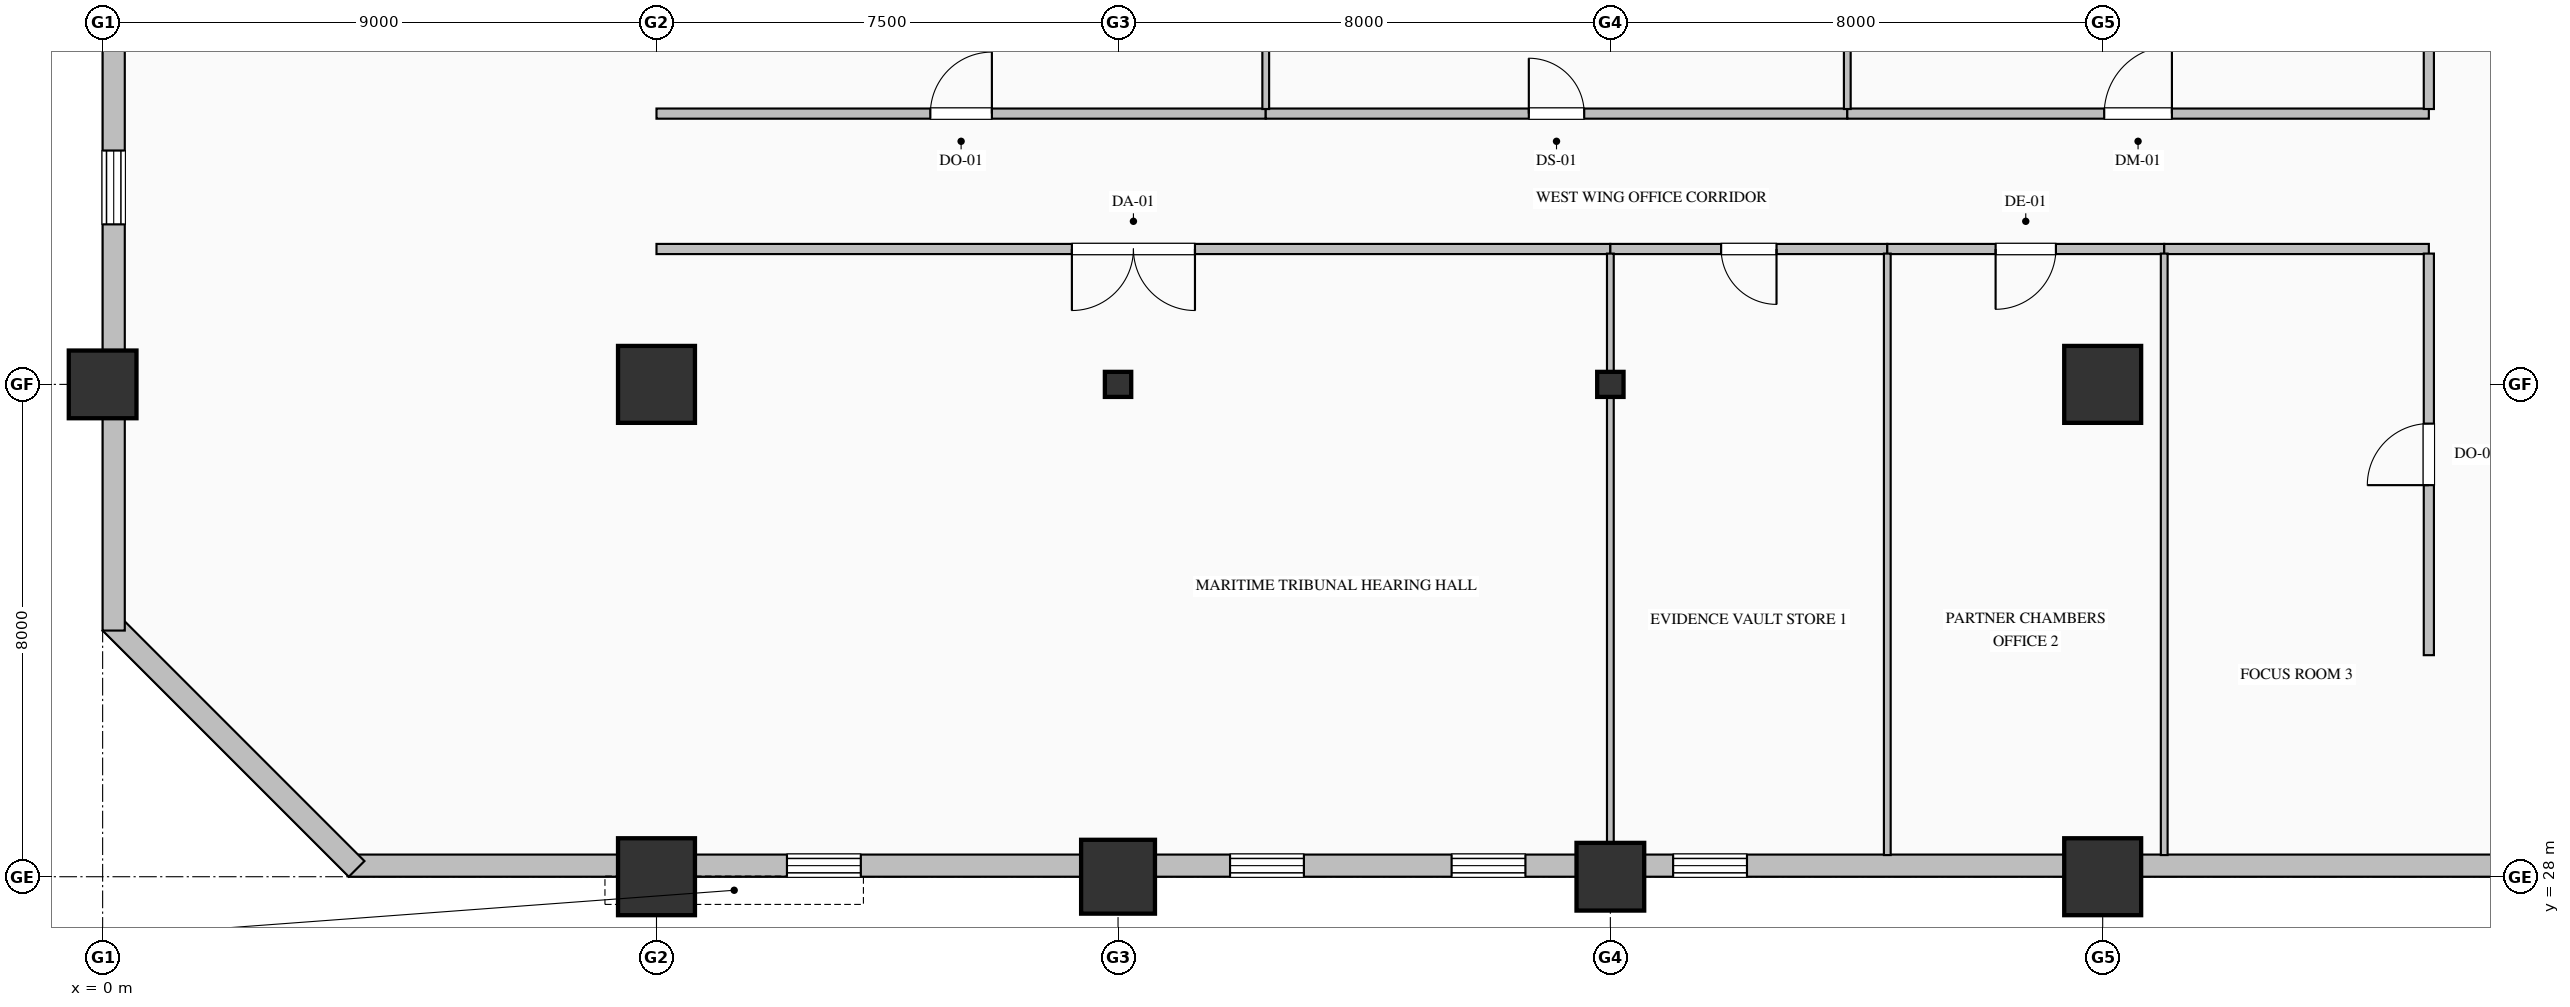
"""IFC4 building model, lengths in metres.
Left out: names, types, materials, properties, quantities, classifications, styles, units other than length and angle.
Written with IfcOpenShell. Run it as: python <this file> out.ifc"""

import sys

from ifc_helpers import new_model, si_unit, direction, frame, frame_2d, origin, origin_2d, place, context, subcontext, project, spatial, rectangle, hollow_rectangle, hollow_circle, i_section, extrude, element, fill, save


model = new_model("IFC4")
c1 = context("Model", 3, precision=1e-05, world=origin(), true_north=direction((0.0, 1.0)))
c2 = subcontext(c1, "Body", "Model", "MODEL_VIEW")
j1 = project(units=[si_unit("LENGTHUNIT", "METRE"), si_unit("PLANEANGLEUNIT", "RADIAN")], contexts=[c1])
p1 = place(None, origin())
s1 = spatial("IfcSite", under=j1, at=p1, CompositionType="ELEMENT")
p2 = place(p1, origin())
s2 = spatial("IfcBuilding", under=s1, at=p2, CompositionType="ELEMENT")
p3 = place(p2, frame((0.0, 0.0, 104.2)))
s3 = spatial("IfcBuildingStorey", under=s2, at=p3, CompositionType="ELEMENT", Elevation=104.2)
p4 = place(p3, frame((0.0, 36.0, 0.0), z_axis=(0.0, 0.0, 1.0), x_axis=(1.0, 0.0, 0.0)))
e1 = element("IfcColumn", 1, at=p4, inside=s3, PredefinedType="COLUMN", context=c2, shape_type="SweptSolid", body=[
    extrude(hollow_rectangle(XDim=1.1, YDim=1.1, WallThickness=0.04, at=origin_2d()), origin(), (0.0, 0.0, 1.0), 4.0),
])
for number, where, z_axis, x_axis in (
    (2, (9.0, 28.0, 0.0), (0.0, 0.0, 1.0), (1.0, 0.0, 0.0)),
    (3, (9.0, 36.0, 0.0), (0.0, 0.0, 1.0), (1.0, 0.0, 0.0)),
):
    element("IfcColumn", number, at=place(p3, frame(where, z_axis=z_axis, x_axis=x_axis)), inside=s3, PredefinedType="COLUMN", context=c2, shape_type="SweptSolid", body=[
        extrude(hollow_rectangle(XDim=1.25, YDim=1.25, WallThickness=0.045, at=origin_2d()), origin(), (0.0, 0.0, 1.0), 4.0),
    ])
p5 = place(p3, frame((16.5, 28.0, 0.0), z_axis=(0.0, 0.0, 1.0), x_axis=(1.0, 0.0, 0.0)))
e4 = element("IfcColumn", 4, at=p5, inside=s3, PredefinedType="COLUMN", context=c2, shape_type="SweptSolid", body=[
    extrude(hollow_circle(Radius=0.6, WallThickness=0.04, at=origin_2d()), origin(), (0.0, 0.0, 1.0), 4.0),
])
p6 = place(p3, frame((16.5, 36.0, 0.0), z_axis=(0.0, 0.0, 1.0), x_axis=(1.0, 0.0, 0.0)))
e5 = element("IfcColumn", 5, at=p6, inside=s3, PredefinedType="COLUMN", context=c2, shape_type="SweptSolid", body=[
    extrude(i_section(OverallWidth=0.407, OverallDepth=0.428, WebThickness=0.02, FlangeThickness=0.035, FilletRadius=0.022, at=origin_2d()), origin(), (0.0, 0.0, 1.0), 4.0),
])
p7 = place(p3, frame((24.5, 28.0, 0.0), z_axis=(0.0, 0.0, 1.0), x_axis=(1.0, 0.0, 0.0)))
e6 = element("IfcColumn", 6, at=p7, inside=s3, PredefinedType="COLUMN", context=c2, shape_type="SweptSolid", body=[
    extrude(hollow_rectangle(XDim=1.1, YDim=1.1, WallThickness=0.04, at=origin_2d()), origin(), (0.0, 0.0, 1.0), 4.0),
])
p8 = place(p3, frame((24.5, 36.0, 0.0), z_axis=(0.0, 0.0, 1.0), x_axis=(1.0, 0.0, 0.0)))
e7 = element("IfcColumn", 7, at=p8, inside=s3, PredefinedType="COLUMN", context=c2, shape_type="SweptSolid", body=[
    extrude(i_section(OverallWidth=0.407, OverallDepth=0.428, WebThickness=0.02, FlangeThickness=0.035, FilletRadius=0.022, at=origin_2d()), origin(), (0.0, 0.0, 1.0), 4.0),
])
for number, where, z_axis, x_axis in (
    (8, (32.5, 28.0, 0.0), (0.0, 0.0, 1.0), (1.0, 0.0, 0.0)),
    (9, (32.5, 36.0, 0.0), (0.0, 0.0, 1.0), (1.0, 0.0, 0.0)),
):
    element("IfcColumn", number, at=place(p3, frame(where, z_axis=z_axis, x_axis=x_axis)), inside=s3, PredefinedType="COLUMN", context=c2, shape_type="SweptSolid", body=[
        extrude(hollow_rectangle(XDim=1.25, YDim=1.25, WallThickness=0.045, at=origin_2d()), origin(), (0.0, 0.0, 1.0), 4.0),
    ])
p9 = place(p3, frame((40.52, 28.18, 0.0), z_axis=(0.0, 0.0, 1.0), x_axis=(-1.0, 0.0, 0.0)))
e10 = element("IfcWall", 10, at=p9, inside=s3, PredefinedType="SOLIDWALL", context=c2, shape_type="SweptSolid", body=[
    extrude(rectangle(XDim=36.52, YDim=0.36, at=frame_2d((18.26, 0.0))), origin(), (0.0, 0.0, 1.0), 2.95),
])
p10 = place(p9, frame((13.8, 0.0, 0.7)))
e11 = element("IfcOpeningElement", 11, at=p10, cuts=e10, PredefinedType="OPENING", context=c2, shape_type="SweptSolid", body=[
    extrude(rectangle(XDim=1.2, YDim=1.85, at=frame_2d((0.6, 0.925))), frame((0.0, 0.19, 0.0), z_axis=(0.0, -1.0, 0.0), x_axis=(1.0, 0.0, 0.0)), (0.0, 0.0, 1.0), 0.38),
])
p11 = place(p9, frame((17.4, 0.0, 0.7)))
e12 = element("IfcOpeningElement", 12, at=p11, cuts=e10, PredefinedType="OPENING", context=c2, shape_type="SweptSolid", body=[
    extrude(rectangle(XDim=1.2, YDim=1.85, at=frame_2d((0.6, 0.925))), frame((0.0, 0.19, 0.0), z_axis=(0.0, -1.0, 0.0), x_axis=(1.0, 0.0, 0.0)), (0.0, 0.0, 1.0), 0.38),
])
p12 = place(p9, frame((21.0, 0.0, 0.7)))
e13 = element("IfcOpeningElement", 13, at=p12, cuts=e10, PredefinedType="OPENING", context=c2, shape_type="SweptSolid", body=[
    extrude(rectangle(XDim=1.2, YDim=1.85, at=frame_2d((0.6, 0.925))), frame((0.0, 0.19, 0.0), z_axis=(0.0, -1.0, 0.0), x_axis=(1.0, 0.0, 0.0)), (0.0, 0.0, 1.0), 0.38),
])
p13 = place(p9, frame((28.2, 0.0, 0.7)))
e14 = element("IfcOpeningElement", 14, at=p13, cuts=e10, PredefinedType="OPENING", context=c2, shape_type="SweptSolid", body=[
    extrude(rectangle(XDim=1.2, YDim=1.85, at=frame_2d((0.6, 0.925))), frame((0.0, 0.19, 0.0), z_axis=(0.0, -1.0, 0.0), x_axis=(1.0, 0.0, 0.0)), (0.0, 0.0, 1.0), 0.38),
])
p14 = place(p3, frame((4.127, 28.127, 0.0), z_axis=(0.0, 0.0, 1.0), x_axis=(-0.707106781187, 0.707106781187, 0.0)))
e15 = element("IfcWall", 15, at=p14, inside=s3, PredefinedType="SOLIDWALL", context=c2, shape_type="SweptSolid", body=[
    extrude(rectangle(XDim=5.657, YDim=0.36, at=frame_2d((2.828, 0.0))), origin(), (0.0, 0.0, 1.0), 3.65),
])
p15 = place(p3, frame((0.18, 32.0, 0.0), z_axis=(0.0, 0.0, 1.0), x_axis=(0.0, 1.0, 0.0)))
e16 = element("IfcWall", 16, at=p15, inside=s3, PredefinedType="SOLIDWALL", context=c2, shape_type="SweptSolid", body=[
    extrude(rectangle(XDim=16.0, YDim=0.36, at=frame_2d((8.0, 0.0))), origin(), (0.0, 0.0, 1.0), 3.15),
])
p16 = place(p15, frame((6.6, 0.0, 0.7)))
e17 = element("IfcOpeningElement", 17, at=p16, cuts=e16, PredefinedType="OPENING", context=c2, shape_type="SweptSolid", body=[
    extrude(rectangle(XDim=1.2, YDim=1.85, at=frame_2d((0.6, 0.925))), frame((0.0, 0.19, 0.0), z_axis=(0.0, -1.0, 0.0), x_axis=(1.0, 0.0, 0.0)), (0.0, 0.0, 1.0), 0.38),
])
p17 = place(p3, frame((9.0, 40.4, 0.0), z_axis=(0.0, 0.0, 1.0), x_axis=(1.0, 0.0, 0.0)))
e18 = element("IfcWall", 18, at=p17, inside=s3, PredefinedType="PARTITIONING", context=c2, shape_type="SweptSolid", body=[
    extrude(rectangle(XDim=9.9, YDim=0.165, at=frame_2d((4.95, 0.0))), origin(), (0.0, 0.0, 1.0), 3.65),
])
p18 = place(p17, frame((4.45, 0.0, 0.0)))
e19 = element("IfcOpeningElement", 19, at=p18, cuts=e18, PredefinedType="OPENING", context=c2, shape_type="SweptSolid", body=[
    extrude(rectangle(XDim=1.0, YDim=2.15, at=frame_2d((0.5, 1.075))), frame((0.0, 0.093, 0.0), z_axis=(0.0, -1.0, 0.0), x_axis=(1.0, 0.0, 0.0)), (0.0, 0.0, 1.0), 0.185),
])
p19 = place(p3, frame((18.9, 40.4, 0.0), z_axis=(0.0, 0.0, 1.0), x_axis=(1.0, 0.0, 0.0)))
e20 = element("IfcWall", 20, at=p19, inside=s3, PredefinedType="PARTITIONING", context=c2, shape_type="SweptSolid", body=[
    extrude(rectangle(XDim=9.45, YDim=0.165, at=frame_2d((4.725, 0.0))), origin(), (0.0, 0.0, 1.0), 3.65),
])
p20 = place(p19, frame((4.275, 0.0, 0.0)))
e21 = element("IfcOpeningElement", 21, at=p20, cuts=e20, PredefinedType="OPENING", context=c2, shape_type="SweptSolid", body=[
    extrude(rectangle(XDim=0.9, YDim=2.15, at=frame_2d((0.45, 1.075))), frame((0.0, 0.093, 0.0), z_axis=(0.0, -1.0, 0.0), x_axis=(1.0, 0.0, 0.0)), (0.0, 0.0, 1.0), 0.185),
])
p21 = place(p3, frame((28.35, 40.4, 0.0), z_axis=(0.0, 0.0, 1.0), x_axis=(1.0, 0.0, 0.0)))
e22 = element("IfcWall", 22, at=p21, inside=s3, PredefinedType="PARTITIONING", context=c2, shape_type="SweptSolid", body=[
    extrude(rectangle(XDim=9.45, YDim=0.165, at=frame_2d((4.725, 0.0))), origin(), (0.0, 0.0, 1.0), 3.65),
])
p22 = place(p21, frame((4.175, 0.0, 0.0)))
e23 = element("IfcOpeningElement", 23, at=p22, cuts=e22, PredefinedType="OPENING", context=c2, shape_type="SweptSolid", body=[
    extrude(rectangle(XDim=1.1, YDim=2.2, at=frame_2d((0.55, 1.1))), frame((0.0, 0.093, 0.0), z_axis=(0.0, -1.0, 0.0), x_axis=(1.0, 0.0, 0.0)), (0.0, 0.0, 1.0), 0.185),
])
p23 = place(p3, frame((24.5, 38.2, 0.0), z_axis=(0.0, 0.0, 1.0), x_axis=(-1.0, 0.0, 0.0)))
e24 = element("IfcWall", 24, at=p23, inside=s3, PredefinedType="PARTITIONING", context=c2, shape_type="SweptSolid", body=[
    extrude(rectangle(XDim=15.5, YDim=0.165, at=frame_2d((7.75, 0.0))), origin(), (0.0, 0.0, 1.0), 3.65),
])
p24 = place(p23, frame((6.75, 0.0, 0.0)))
e25 = element("IfcOpeningElement", 25, at=p24, cuts=e24, PredefinedType="OPENING", context=c2, shape_type="SweptSolid", body=[
    extrude(rectangle(XDim=2.0, YDim=2.4, at=frame_2d((1.0, 1.2))), frame((0.0, 0.093, 0.0), z_axis=(0.0, -1.0, 0.0), x_axis=(1.0, 0.0, 0.0)), (0.0, 0.0, 1.0), 0.185),
])
p25 = place(p3, frame((29.0, 38.2, 0.0), z_axis=(0.0, 0.0, 1.0), x_axis=(-1.0, 0.0, 0.0)))
e26 = element("IfcWall", 26, at=p25, inside=s3, PredefinedType="PARTITIONING", context=c2, shape_type="SweptSolid", body=[
    extrude(rectangle(XDim=4.5, YDim=0.165, at=frame_2d((2.25, 0.0))), origin(), (0.0, 0.0, 1.0), 3.65),
])
p26 = place(p25, frame((1.8, 0.0, 0.0)))
e27 = element("IfcOpeningElement", 27, at=p26, cuts=e26, PredefinedType="OPENING", context=c2, shape_type="SweptSolid", body=[
    extrude(rectangle(XDim=0.9, YDim=2.15, at=frame_2d((0.45, 1.075))), frame((0.0, 0.093, 0.0), z_axis=(0.0, -1.0, 0.0), x_axis=(1.0, 0.0, 0.0)), (0.0, 0.0, 1.0), 0.185),
])
p27 = place(p3, frame((33.5, 38.2, 0.0), z_axis=(0.0, 0.0, 1.0), x_axis=(-1.0, 0.0, 0.0)))
e28 = element("IfcWall", 28, at=p27, inside=s3, PredefinedType="PARTITIONING", context=c2, shape_type="SweptSolid", body=[
    extrude(rectangle(XDim=4.5, YDim=0.165, at=frame_2d((2.25, 0.0))), origin(), (0.0, 0.0, 1.0), 3.65),
])
p28 = place(p27, frame((1.76, 0.0, 0.0)))
e29 = element("IfcOpeningElement", 29, at=p28, cuts=e28, PredefinedType="OPENING", context=c2, shape_type="SweptSolid", body=[
    extrude(rectangle(XDim=0.98, YDim=2.25, at=frame_2d((0.49, 1.125))), frame((0.0, 0.093, 0.0), z_axis=(0.0, -1.0, 0.0), x_axis=(1.0, 0.0, 0.0)), (0.0, 0.0, 1.0), 0.185),
])
p29 = place(p3, frame((37.8, 38.2, 0.0), z_axis=(0.0, 0.0, 1.0), x_axis=(-1.0, 0.0, 0.0)))
e30 = element("IfcWall", 30, at=p29, inside=s3, PredefinedType="PARTITIONING", context=c2, shape_type="SweptSolid", body=[
    extrude(rectangle(XDim=4.3, YDim=0.165, at=frame_2d((2.15, 0.0))), origin(), (0.0, 0.0, 1.0), 3.65),
])
p30 = place(p3, frame((37.8, 40.475, 0.0), z_axis=(0.0, 0.0, 1.0), x_axis=(0.0, 1.0, 0.0)))
e31 = element("IfcWall", 31, at=p30, inside=s3, PredefinedType="PARTITIONING", context=c2, shape_type="SweptSolid", body=[
    extrude(rectangle(XDim=3.651, YDim=0.165, at=frame_2d((1.825, 0.0))), origin(), (0.0, 0.0, 1.0), 3.65),
])
p31 = place(p3, frame((37.8, 31.6, 0.0), z_axis=(0.0, 0.0, 1.0), x_axis=(0.0, 1.0, 0.0)))
e32 = element("IfcWall", 32, at=p31, inside=s3, PredefinedType="PARTITIONING", context=c2, shape_type="SweptSolid", body=[
    extrude(rectangle(XDim=6.525, YDim=0.165, at=frame_2d((3.263, 0.0))), origin(), (0.0, 0.0, 1.0), 3.65),
])
p32 = place(p31, frame((2.763, 0.0, 0.0)))
e33 = element("IfcOpeningElement", 33, at=p32, cuts=e32, PredefinedType="OPENING", context=c2, shape_type="SweptSolid", body=[
    extrude(rectangle(XDim=1.0, YDim=2.15, at=frame_2d((0.5, 1.075))), frame((0.0, 0.093, 0.0), z_axis=(0.0, -1.0, 0.0), x_axis=(1.0, 0.0, 0.0)), (0.0, 0.0, 1.0), 0.185),
])
for number, where, z_axis, x_axis in (
    (34, (18.9, 51.648, 0.0), (0.0, 0.0, 1.0), (0.0, -1.0, 0.0)),
    (35, (28.35, 51.648, 0.0), (0.0, 0.0, 1.0), (0.0, -1.0, 0.0)),
):
    element("IfcWall", number, at=place(p3, frame(where, z_axis=z_axis, x_axis=x_axis)), inside=s3, PredefinedType="MOVABLE", context=c2, shape_type="SweptSolid", body=[
        extrude(rectangle(XDim=11.173, YDim=0.11, at=frame_2d((5.587, 0.0))), origin(), (0.0, 0.0, 1.0), 3.65),
    ])
p33 = place(p3, frame((24.5, 38.125, 0.0), z_axis=(0.0, 0.0, 1.0), x_axis=(0.0, -1.0, 0.0)))
e36 = element("IfcWall", 36, at=p33, inside=s3, PredefinedType="MOVABLE", context=c2, shape_type="SweptSolid", body=[
    extrude(rectangle(XDim=9.773, YDim=0.11, at=frame_2d((4.887, 0.0))), origin(), (0.0, 0.0, 1.0), 2.942),
])
for number, where, z_axis, x_axis in (
    (37, (29.0, 38.125, 0.0), (0.0, 0.0, 1.0), (0.0, -1.0, 0.0)),
    (38, (33.5, 38.125, 0.0), (0.0, 0.0, 1.0), (0.0, -1.0, 0.0)),
):
    element("IfcWall", number, at=place(p3, frame(where, z_axis=z_axis, x_axis=x_axis)), inside=s3, PredefinedType="MOVABLE", context=c2, shape_type="SweptSolid", body=[
        extrude(rectangle(XDim=9.773, YDim=0.11, at=frame_2d((4.887, 0.0))), origin(), (0.0, 0.0, 1.0), 3.65),
    ])
p34 = place(p10, origin())
e39 = element("IfcWindow", 39, at=p34, inside=s3, PartitioningType="DOUBLE_PANEL_VERTICAL", PredefinedType="WINDOW", context=c2, shape_type="SweptSolid", body=[
    extrude(rectangle(XDim=1.2, YDim=1.85, at=frame_2d((0.6, 0.925))), frame((0.0, 0.15, 0.0), z_axis=(0.0, -1.0, 0.0), x_axis=(1.0, 0.0, 0.0)), (0.0, 0.0, 1.0), 0.06),
])
fill(e11, e39)
p35 = place(p11, origin())
e40 = element("IfcWindow", 40, at=p35, inside=s3, PartitioningType="DOUBLE_PANEL_VERTICAL", PredefinedType="WINDOW", context=c2, shape_type="SweptSolid", body=[
    extrude(rectangle(XDim=1.2, YDim=1.85, at=frame_2d((0.6, 0.925))), frame((0.0, 0.15, 0.0), z_axis=(0.0, -1.0, 0.0), x_axis=(1.0, 0.0, 0.0)), (0.0, 0.0, 1.0), 0.06),
])
fill(e12, e40)
p36 = place(p12, origin())
e41 = element("IfcWindow", 41, at=p36, inside=s3, PartitioningType="DOUBLE_PANEL_VERTICAL", PredefinedType="WINDOW", context=c2, shape_type="SweptSolid", body=[
    extrude(rectangle(XDim=1.2, YDim=1.85, at=frame_2d((0.6, 0.925))), frame((0.0, 0.15, 0.0), z_axis=(0.0, -1.0, 0.0), x_axis=(1.0, 0.0, 0.0)), (0.0, 0.0, 1.0), 0.06),
])
fill(e13, e41)
p37 = place(p13, origin())
e42 = element("IfcWindow", 42, at=p37, inside=s3, PartitioningType="DOUBLE_PANEL_VERTICAL", PredefinedType="WINDOW", context=c2, shape_type="SweptSolid", body=[
    extrude(rectangle(XDim=1.2, YDim=1.85, at=frame_2d((0.6, 0.925))), frame((0.0, 0.15, 0.0), z_axis=(0.0, -1.0, 0.0), x_axis=(1.0, 0.0, 0.0)), (0.0, 0.0, 1.0), 0.06),
])
fill(e14, e42)
p38 = place(p16, origin())
e43 = element("IfcWindow", 43, at=p38, inside=s3, PartitioningType="DOUBLE_PANEL_VERTICAL", PredefinedType="WINDOW", context=c2, shape_type="SweptSolid", body=[
    extrude(rectangle(XDim=1.2, YDim=1.85, at=frame_2d((0.6, 0.925))), frame((0.0, 0.15, 0.0), z_axis=(0.0, -1.0, 0.0), x_axis=(1.0, 0.0, 0.0)), (0.0, 0.0, 1.0), 0.06),
])
fill(e17, e43)
p39 = place(p18, origin())
e44 = element("IfcDoor", 44, at=p39, inside=s3, OperationType="SINGLE_SWING_RIGHT", PredefinedType="DOOR", context=c2, shape_type="SweptSolid", body=[
    extrude(rectangle(XDim=1.0, YDim=2.15, at=frame_2d((0.5, 1.075))), frame((0.0, 0.025, 0.0), z_axis=(0.0, -1.0, 0.0), x_axis=(1.0, 0.0, 0.0)), (0.0, 0.0, 1.0), 0.05),
])
fill(e19, e44)
p40 = place(p20, origin())
e45 = element("IfcDoor", 45, at=p40, inside=s3, OperationType="SINGLE_SWING_LEFT", PredefinedType="DOOR", context=c2, shape_type="SweptSolid", body=[
    extrude(rectangle(XDim=0.9, YDim=2.15, at=frame_2d((0.45, 1.075))), frame((0.0, 0.025, 0.0), z_axis=(0.0, -1.0, 0.0), x_axis=(1.0, 0.0, 0.0)), (0.0, 0.0, 1.0), 0.05),
])
fill(e21, e45)
p41 = place(p22, origin())
e46 = element("IfcDoor", 46, at=p41, inside=s3, OperationType="SINGLE_SWING_RIGHT", PredefinedType="DOOR", context=c2, shape_type="SweptSolid", body=[
    extrude(rectangle(XDim=1.1, YDim=2.2, at=frame_2d((0.55, 1.1))), frame((0.0, 0.025, 0.0), z_axis=(0.0, -1.0, 0.0), x_axis=(1.0, 0.0, 0.0)), (0.0, 0.0, 1.0), 0.05),
])
fill(e23, e46)
p42 = place(p24, origin())
e47 = element("IfcDoor", 47, at=p42, inside=s3, OperationType="DOUBLE_DOOR_SINGLE_SWING", PredefinedType="DOOR", context=c2, shape_type="SweptSolid", body=[
    extrude(rectangle(XDim=2.0, YDim=2.4, at=frame_2d((1.0, 1.2))), frame((0.0, 0.025, 0.0), z_axis=(0.0, -1.0, 0.0), x_axis=(1.0, 0.0, 0.0)), (0.0, 0.0, 1.0), 0.05),
])
fill(e25, e47)
p43 = place(p26, origin())
e48 = element("IfcDoor", 48, at=p43, inside=s3, OperationType="SINGLE_SWING_LEFT", PredefinedType="DOOR", context=c2, shape_type="SweptSolid", body=[
    extrude(rectangle(XDim=0.9, YDim=2.15, at=frame_2d((0.45, 1.075))), frame((0.0, 0.025, 0.0), z_axis=(0.0, -1.0, 0.0), x_axis=(1.0, 0.0, 0.0)), (0.0, 0.0, 1.0), 0.05),
])
fill(e27, e48)
p44 = place(p28, origin())
e49 = element("IfcDoor", 49, at=p44, inside=s3, OperationType="SINGLE_SWING_RIGHT", PredefinedType="DOOR", context=c2, shape_type="SweptSolid", body=[
    extrude(rectangle(XDim=0.98, YDim=2.25, at=frame_2d((0.49, 1.125))), frame((0.0, 0.025, 0.0), z_axis=(0.0, -1.0, 0.0), x_axis=(1.0, 0.0, 0.0)), (0.0, 0.0, 1.0), 0.05),
])
fill(e29, e49)
p45 = place(p32, origin())
e50 = element("IfcDoor", 50, at=p45, inside=s3, OperationType="SINGLE_SWING_LEFT", PredefinedType="DOOR", context=c2, shape_type="SweptSolid", body=[
    extrude(rectangle(XDim=1.0, YDim=2.15, at=frame_2d((0.5, 1.075))), frame((0.0, 0.025, 0.0), z_axis=(0.0, -1.0, 0.0), x_axis=(1.0, 0.0, 0.0)), (0.0, 0.0, 1.0), 0.05),
])
fill(e33, e50)
save(model, sys.argv[1])
